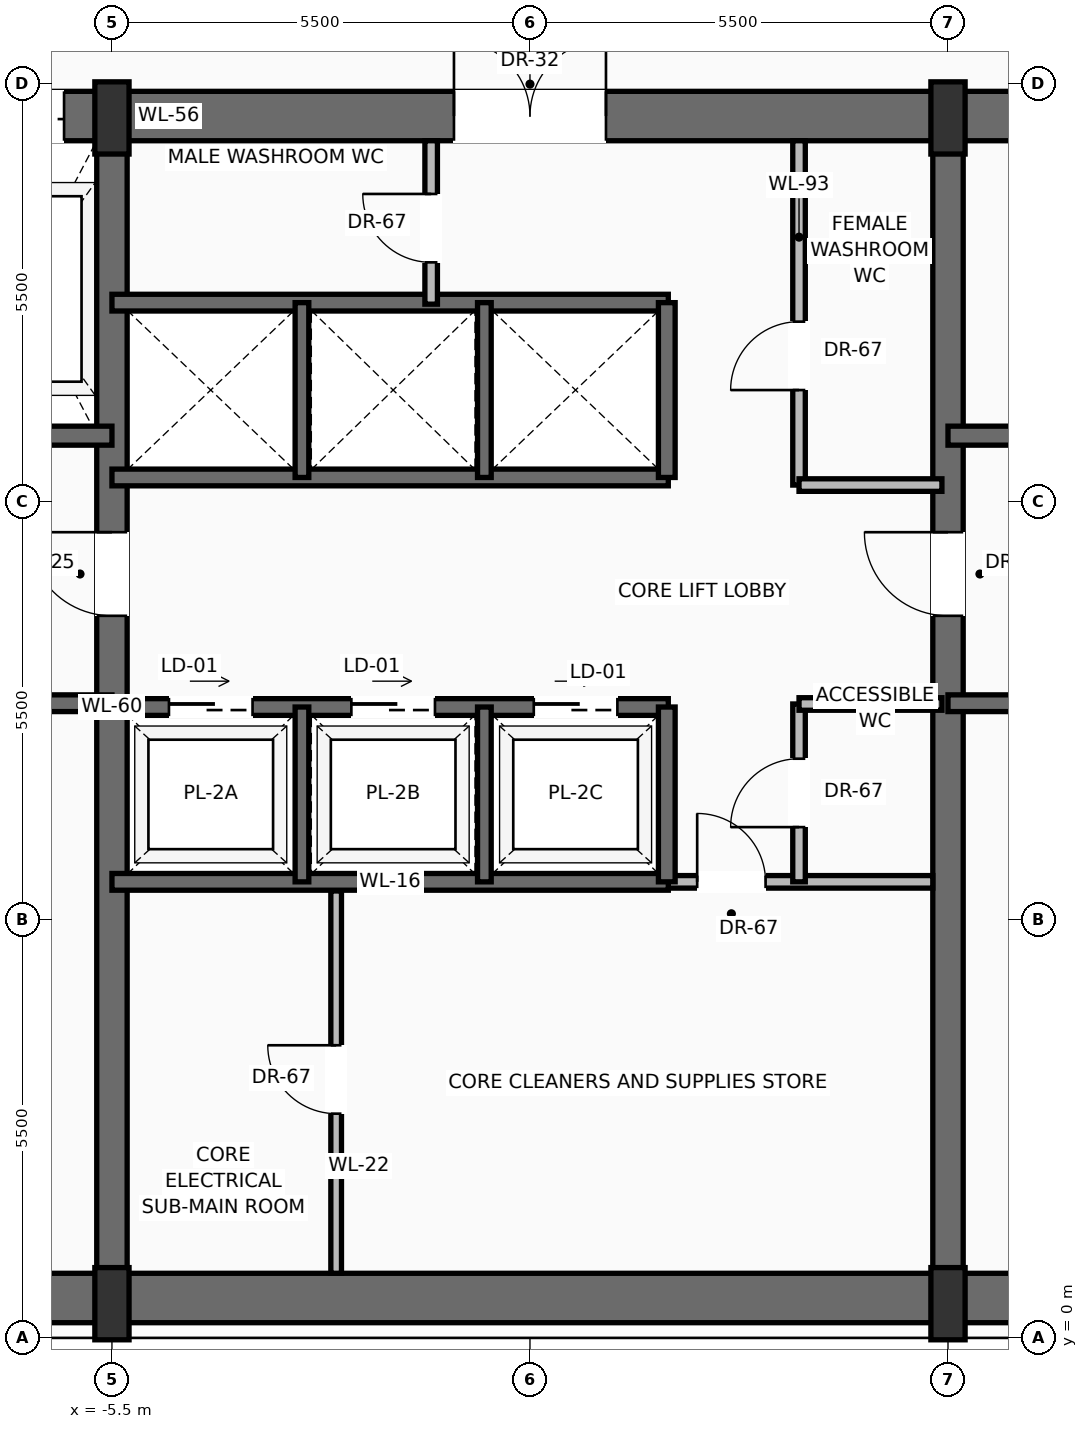
"""IFC4 building model, lengths in metres.
Left out: names, types, materials, properties, quantities, classifications, styles, units other than length and angle.
Written with IfcOpenShell. Run it as: python <this file> out.ifc"""

import sys

from ifc_helpers import new_model, si_unit, direction, frame, frame_2d, origin, origin_2d, place, context, subcontext, project, spatial, rectangle, extrude, source, transform, mapped, element, fill, save


model = new_model("IFC4")
c1 = context("Model", 3, precision=1e-05, world=origin(), true_north=direction((0.0, 1.0)))
c2 = subcontext(c1, "Body", "Model", "MODEL_VIEW")
j1 = project(units=[si_unit("LENGTHUNIT", "METRE"), si_unit("PLANEANGLEUNIT", "RADIAN")], contexts=[c1])
p1 = place(None, origin())
s1 = spatial("IfcSite", under=j1, at=p1, CompositionType="ELEMENT")
p2 = place(p1, origin())
s2 = spatial("IfcBuilding", under=s1, at=p2, CompositionType="ELEMENT")
p3 = place(p2, frame((0.0, 0.0, 189.5)))
s3 = spatial("IfcBuildingStorey", under=s2, at=p3, CompositionType="ELEMENT", Elevation=189.5)
p4 = place(p3, frame((-10.65, 0.525, 0.0), z_axis=(0.0, 0.0, 1.0), x_axis=(1.0, 0.0, 0.0)))
e1 = element("IfcWall", 1, at=p4, inside=s3, PredefinedType="SHEAR", context=c2, shape_type="SweptSolid", body=[
    extrude(rectangle(XDim=21.3, YDim=0.65, at=frame_2d((10.65, 0.0))), origin(), (0.0, 0.0, 1.0), 3.47),
])
p5 = place(p3, frame((-10.8, 16.075, 0.0), z_axis=(0.0, 0.0, 1.0), x_axis=(1.0, 0.0, 0.0)))
e2 = element("IfcWall", 2, at=p5, inside=s3, PredefinedType="SHEAR", context=c2, shape_type="SweptSolid", body=[
    extrude(rectangle(XDim=21.6, YDim=0.65, at=frame_2d((10.8, 0.0))), origin(), (0.0, 0.0, 1.0), 3.47),
])
p6 = place(p5, frame((3.37, 0.0, 0.0)))
e3 = element("IfcOpeningElement", 3, at=p6, cuts=e2, PredefinedType="OPENING", context=c2, shape_type="SweptSolid", body=[
    extrude(rectangle(XDim=1.3, YDim=2.3, at=frame_2d((0.65, 1.15))), frame((0.0, 0.335, 0.0), z_axis=(0.0, -1.0, 0.0), x_axis=(1.0, 0.0, 0.0)), (0.0, 0.0, 1.0), 0.67),
])
p7 = place(p5, frame((9.8, 0.0, 0.0)))
e4 = element("IfcOpeningElement", 4, at=p7, cuts=e2, PredefinedType="OPENING", context=c2, shape_type="SweptSolid", body=[
    extrude(rectangle(XDim=2.0, YDim=2.4, at=frame_2d((1.0, 1.2))), frame((0.0, 0.335, 0.0), z_axis=(0.0, -1.0, 0.0), x_axis=(1.0, 0.0, 0.0)), (0.0, 0.0, 1.0), 0.67),
])
p8 = place(p3, frame((-5.5, 0.525, 0.0), z_axis=(0.0, 0.0, 1.0), x_axis=(0.0, 1.0, 0.0)))
e5 = element("IfcWall", 5, at=p8, inside=s3, PredefinedType="SHEAR", context=c2, shape_type="SweptSolid", body=[
    extrude(rectangle(XDim=15.55, YDim=0.4, at=frame_2d((7.775, 0.0))), origin(), (0.0, 0.0, 1.0), 3.47),
])
p9 = place(p8, frame((8.975, 0.0, 0.0)))
e6 = element("IfcOpeningElement", 6, at=p9, cuts=e5, PredefinedType="OPENING", context=c2, shape_type="SweptSolid", body=[
    extrude(rectangle(XDim=1.1, YDim=2.2, at=frame_2d((0.55, 1.1))), frame((0.0, 0.21, 0.0), z_axis=(0.0, -1.0, 0.0), x_axis=(1.0, 0.0, 0.0)), (0.0, 0.0, 1.0), 0.42),
])
p10 = place(p3, frame((5.5, 0.525, 0.0), z_axis=(0.0, 0.0, 1.0), x_axis=(0.0, 1.0, 0.0)))
e7 = element("IfcWall", 7, at=p10, inside=s3, PredefinedType="SHEAR", context=c2, shape_type="SweptSolid", body=[
    extrude(rectangle(XDim=15.55, YDim=0.4, at=frame_2d((7.775, 0.0))), origin(), (0.0, 0.0, 1.0), 3.47),
])
p11 = place(p10, frame((8.975, 0.0, 0.0)))
e8 = element("IfcOpeningElement", 8, at=p11, cuts=e7, PredefinedType="OPENING", context=c2, shape_type="SweptSolid", body=[
    extrude(rectangle(XDim=1.1, YDim=2.2, at=frame_2d((0.55, 1.1))), frame((0.0, 0.21, 0.0), z_axis=(0.0, -1.0, 0.0), x_axis=(1.0, 0.0, 0.0)), (0.0, 0.0, 1.0), 0.42),
])
m1 = source(origin(), c2, "Body", "SweptSolid", [
    extrude(rectangle(XDim=0.45, YDim=0.95, at=origin_2d()), origin(), (0.0, 0.0, 1.0), 3.7),
])
for number, where, z_axis, x_axis in (
    (9, (-5.5, 0.45, 0.0), (0.0, 0.0, 1.0), (1.0, 0.0, 0.0)),
    (10, (5.5, 0.45, 0.0), (0.0, 0.0, 1.0), (1.0, 0.0, 0.0)),
    (11, (-5.5, 16.05, 0.0), (0.0, 0.0, 1.0), (1.0, 0.0, 0.0)),
    (12, (5.5, 16.05, 0.0), (0.0, 0.0, 1.0), (1.0, 0.0, 0.0)),
):
    element("IfcColumn", number, at=place(p3, frame(where, z_axis=z_axis, x_axis=x_axis)), inside=s3, PredefinedType="PILASTER", context=c2, shape_type="MappedRepresentation", body=[
        mapped(m1, transform((0.0, 0.0, 0.0), scale=1.0)),
    ])
p12 = place(p3, frame((-5.5, 8.35, 0.0), z_axis=(0.0, 0.0, 1.0), x_axis=(-1.0, 0.0, 0.0)))
e13 = element("IfcWall", 13, at=p12, inside=s3, PredefinedType="SOLIDWALL", context=c2, shape_type="SweptSolid", body=[
    extrude(rectangle(XDim=4.65, YDim=0.22, at=frame_2d((2.325, 0.0))), origin(), (0.0, 0.0, 1.0), 3.47),
])
p13 = place(p12, frame((2.5, 0.0, 0.0)))
e14 = element("IfcOpeningElement", 14, at=p13, cuts=e13, PredefinedType="OPENING", context=c2, shape_type="SweptSolid", body=[
    extrude(rectangle(XDim=1.15, YDim=2.2, at=frame_2d((0.575, 1.1))), frame((0.0, 0.12, 0.0), z_axis=(0.0, -1.0, 0.0), x_axis=(1.0, 0.0, 0.0)), (0.0, 0.0, 1.0), 0.24),
])
p14 = place(p3, frame((-5.5, 11.87, 0.0), z_axis=(0.0, 0.0, 1.0), x_axis=(-1.0, 0.0, 0.0)))
e15 = element("IfcWall", 15, at=p14, inside=s3, PredefinedType="SOLIDWALL", context=c2, shape_type="SweptSolid", body=[
    extrude(rectangle(XDim=4.65, YDim=0.25, at=frame_2d((2.325, 0.0))), origin(), (0.0, 0.0, 1.0), 3.47),
])
p15 = place(p14, frame((2.95, 0.0, 0.0)))
e16 = element("IfcOpeningElement", 16, at=p15, cuts=e15, PredefinedType="OPENING", context=c2, shape_type="SweptSolid", body=[
    extrude(rectangle(XDim=1.2, YDim=2.25, at=frame_2d((0.6, 1.125))), frame((0.0, 0.135, 0.0), z_axis=(0.0, -1.0, 0.0), x_axis=(1.0, 0.0, 0.0)), (0.0, 0.0, 1.0), 0.27),
])
p16 = place(p3, frame((10.15, 8.35, 0.0), z_axis=(0.0, 0.0, 1.0), x_axis=(-1.0, 0.0, 0.0)))
e17 = element("IfcWall", 17, at=p16, inside=s3, PredefinedType="SOLIDWALL", context=c2, shape_type="SweptSolid", body=[
    extrude(rectangle(XDim=4.65, YDim=0.22, at=frame_2d((2.325, 0.0))), origin(), (0.0, 0.0, 1.0), 3.47),
])
p17 = place(p16, frame((1.0, 0.0, 0.0)))
e18 = element("IfcOpeningElement", 18, at=p17, cuts=e17, PredefinedType="OPENING", context=c2, shape_type="SweptSolid", body=[
    extrude(rectangle(XDim=1.15, YDim=2.2, at=frame_2d((0.575, 1.1))), frame((0.0, 0.12, 0.0), z_axis=(0.0, -1.0, 0.0), x_axis=(1.0, 0.0, 0.0)), (0.0, 0.0, 1.0), 0.24),
])
p18 = place(p3, frame((10.15, 11.87, 0.0), z_axis=(0.0, 0.0, 1.0), x_axis=(-1.0, 0.0, 0.0)))
e19 = element("IfcWall", 19, at=p18, inside=s3, PredefinedType="SOLIDWALL", context=c2, shape_type="SweptSolid", body=[
    extrude(rectangle(XDim=4.65, YDim=0.25, at=frame_2d((2.325, 0.0))), origin(), (0.0, 0.0, 1.0), 3.47),
])
p19 = place(p18, frame((0.5, 0.0, 0.0)))
e20 = element("IfcOpeningElement", 20, at=p19, cuts=e19, PredefinedType="OPENING", context=c2, shape_type="SweptSolid", body=[
    extrude(rectangle(XDim=1.2, YDim=2.25, at=frame_2d((0.6, 1.125))), frame((0.0, 0.135, 0.0), z_axis=(0.0, -1.0, 0.0), x_axis=(1.0, 0.0, 0.0)), (0.0, 0.0, 1.0), 0.27),
])
p20 = place(p3, frame((1.82, 6.0, 0.0), z_axis=(0.0, 0.0, 1.0), x_axis=(1.0, 0.0, 0.0)))
e21 = element("IfcWall", 21, at=p20, inside=s3, PredefinedType="PARTITIONING", context=c2, shape_type="SweptSolid", body=[
    extrude(rectangle(XDim=3.48, YDim=0.165, at=frame_2d((1.74, 0.0))), origin(), (0.0, 0.0, 1.0), 3.462),
])
p21 = place(p20, frame((0.38, 0.0, 0.0)))
e22 = element("IfcOpeningElement", 22, at=p21, cuts=e21, PredefinedType="OPENING", context=c2, shape_type="SweptSolid", body=[
    extrude(rectangle(XDim=0.9, YDim=2.1, at=frame_2d((0.45, 1.05))), frame((0.0, 0.093, 0.0), z_axis=(0.0, -1.0, 0.0), x_axis=(1.0, 0.0, 0.0)), (0.0, 0.0, 1.0), 0.185),
])
p22 = place(p3, frame((-2.55, 0.85, 0.0), z_axis=(0.0, 0.0, 1.0), x_axis=(0.0, 1.0, 0.0)))
e23 = element("IfcWall", 23, at=p22, inside=s3, PredefinedType="PARTITIONING", context=c2, shape_type="SweptSolid", body=[
    extrude(rectangle(XDim=5.03, YDim=0.14, at=frame_2d((2.515, 0.0))), origin(), (0.0, 0.0, 1.0), 3.462),
])
p23 = place(p22, frame((2.1, 0.0, 0.0)))
e24 = element("IfcOpeningElement", 24, at=p23, cuts=e23, PredefinedType="OPENING", context=c2, shape_type="SweptSolid", body=[
    extrude(rectangle(XDim=0.9, YDim=2.1, at=frame_2d((0.45, 1.05))), frame((0.0, 0.08, 0.0), z_axis=(0.0, -1.0, 0.0), x_axis=(1.0, 0.0, 0.0)), (0.0, 0.0, 1.0), 0.16),
])
p24 = place(p3, frame((3.54, 6.0, 0.0), z_axis=(0.0, 0.0, 1.0), x_axis=(0.0, 1.0, 0.0)))
e25 = element("IfcWall", 25, at=p24, inside=s3, PredefinedType="PARTITIONING", context=c2, shape_type="SweptSolid", body=[
    extrude(rectangle(XDim=2.34, YDim=0.165, at=frame_2d((1.17, 0.0))), origin(), (0.0, 0.0, 1.0), 3.462),
])
p25 = place(p24, frame((0.72, 0.0, 0.0)))
e26 = element("IfcOpeningElement", 26, at=p25, cuts=e25, PredefinedType="OPENING", context=c2, shape_type="SweptSolid", body=[
    extrude(rectangle(XDim=0.9, YDim=2.1, at=frame_2d((0.45, 1.05))), frame((0.0, 0.093, 0.0), z_axis=(0.0, -1.0, 0.0), x_axis=(1.0, 0.0, 0.0)), (0.0, 0.0, 1.0), 0.185),
])
p26 = place(p3, frame((3.54, 8.34, 0.0), z_axis=(0.0, 0.0, 1.0), x_axis=(1.0, 0.0, 0.0)))
e27 = element("IfcWall", 27, at=p26, inside=s3, PredefinedType="PARTITIONING", context=c2, shape_type="SweptSolid", body=[
    extrude(rectangle(XDim=1.88, YDim=0.165, at=frame_2d((0.94, 0.0))), origin(), (0.0, 0.0, 1.0), 3.462),
])
p27 = place(p3, frame((-5.5, 6.0, 0.0), z_axis=(0.0, 0.0, 1.0), x_axis=(1.0, 0.0, 0.0)))
e28 = element("IfcWall", 28, at=p27, inside=s3, PredefinedType="SOLIDWALL", context=c2, shape_type="SweptSolid", body=[
    extrude(rectangle(XDim=7.32, YDim=0.22, at=frame_2d((3.66, 0.0))), origin(), (0.0, 0.0, 1.0), 3.47),
])
p28 = place(p3, frame((-5.5, 8.3, 0.0), z_axis=(0.0, 0.0, 1.0), x_axis=(1.0, 0.0, 0.0)))
e29 = element("IfcWall", 29, at=p28, inside=s3, PredefinedType="SOLIDWALL", context=c2, shape_type="SweptSolid", body=[
    extrude(rectangle(XDim=7.32, YDim=0.22, at=frame_2d((3.66, 0.0))), origin(), (0.0, 0.0, 1.0), 3.47),
])
p29 = place(p28, frame((0.75, 0.0, 0.0)))
e30 = element("IfcOpeningElement", 30, at=p29, cuts=e29, PredefinedType="OPENING", context=c2, shape_type="SweptSolid", body=[
    extrude(rectangle(XDim=1.1, YDim=2.2, at=frame_2d((0.55, 1.1))), frame((0.0, 0.12, 0.0), z_axis=(0.0, -1.0, 0.0), x_axis=(1.0, 0.0, 0.0)), (0.0, 0.0, 1.0), 0.24),
])
p30 = place(p28, frame((3.15, 0.0, 0.0)))
e31 = element("IfcOpeningElement", 31, at=p30, cuts=e29, PredefinedType="OPENING", context=c2, shape_type="SweptSolid", body=[
    extrude(rectangle(XDim=1.1, YDim=2.2, at=frame_2d((0.55, 1.1))), frame((0.0, 0.12, 0.0), z_axis=(0.0, -1.0, 0.0), x_axis=(1.0, 0.0, 0.0)), (0.0, 0.0, 1.0), 0.24),
])
p31 = place(p28, frame((5.55, 0.0, 0.0)))
e32 = element("IfcOpeningElement", 32, at=p31, cuts=e29, PredefinedType="OPENING", context=c2, shape_type="SweptSolid", body=[
    extrude(rectangle(XDim=1.1, YDim=2.2, at=frame_2d((0.55, 1.1))), frame((0.0, 0.12, 0.0), z_axis=(0.0, -1.0, 0.0), x_axis=(1.0, 0.0, 0.0)), (0.0, 0.0, 1.0), 0.24),
])
p32 = place(p3, frame((1.8, 6.0, 0.0), z_axis=(0.0, 0.0, 1.0), x_axis=(0.0, 1.0, 0.0)))
e33 = element("IfcWall", 33, at=p32, inside=s3, PredefinedType="SOLIDWALL", context=c2, shape_type="SweptSolid", body=[
    extrude(rectangle(XDim=2.3, YDim=0.22, at=frame_2d((1.15, 0.0))), origin(), (0.0, 0.0, 1.0), 3.47),
])
for number, where, z_axis, x_axis in (
    (34, (-3.0, 6.0, 0.0), (0.0, 0.0, 1.0), (0.0, 1.0, 0.0)),
    (35, (-0.6, 6.0, 0.0), (0.0, 0.0, 1.0), (0.0, 1.0, 0.0)),
):
    element("IfcWall", number, at=place(p3, frame(where, z_axis=z_axis, x_axis=x_axis)), inside=s3, PredefinedType="SOLIDWALL", context=c2, shape_type="SweptSolid", body=[
        extrude(rectangle(XDim=2.3, YDim=0.18, at=frame_2d((1.15, 0.0))), origin(), (0.0, 0.0, 1.0), 3.47),
    ])
for number, where, z_axis, x_axis in (
    (36, (-5.5, 11.32, 0.0), (0.0, 0.0, 1.0), (1.0, 0.0, 0.0)),
    (37, (-5.5, 13.62, 0.0), (0.0, 0.0, 1.0), (1.0, 0.0, 0.0)),
):
    element("IfcWall", number, at=place(p3, frame(where, z_axis=z_axis, x_axis=x_axis)), inside=s3, PredefinedType="SOLIDWALL", context=c2, shape_type="SweptSolid", body=[
        extrude(rectangle(XDim=7.32, YDim=0.22, at=frame_2d((3.66, 0.0))), origin(), (0.0, 0.0, 1.0), 3.47),
    ])
p33 = place(p3, frame((1.8, 11.32, 0.0), z_axis=(0.0, 0.0, 1.0), x_axis=(0.0, 1.0, 0.0)))
e38 = element("IfcWall", 38, at=p33, inside=s3, PredefinedType="SOLIDWALL", context=c2, shape_type="SweptSolid", body=[
    extrude(rectangle(XDim=2.3, YDim=0.22, at=frame_2d((1.15, 0.0))), origin(), (0.0, 0.0, 1.0), 3.47),
])
for number, where, z_axis, x_axis in (
    (39, (-3.0, 11.32, 0.0), (0.0, 0.0, 1.0), (0.0, 1.0, 0.0)),
    (40, (-0.6, 11.32, 0.0), (0.0, 0.0, 1.0), (0.0, 1.0, 0.0)),
):
    element("IfcWall", number, at=place(p3, frame(where, z_axis=z_axis, x_axis=x_axis)), inside=s3, PredefinedType="SOLIDWALL", context=c2, shape_type="SweptSolid", body=[
        extrude(rectangle(XDim=2.3, YDim=0.18, at=frame_2d((1.15, 0.0))), origin(), (0.0, 0.0, 1.0), 3.47),
    ])
p34 = place(p3, frame((-1.3, 13.6, 0.0), z_axis=(0.0, 0.0, 1.0), x_axis=(0.0, 1.0, 0.0)))
e41 = element("IfcWall", 41, at=p34, inside=s3, PredefinedType="PARTITIONING", context=c2, shape_type="SweptSolid", body=[
    extrude(rectangle(XDim=2.15, YDim=0.165, at=frame_2d((1.075, 0.0))), origin(), (0.0, 0.0, 1.0), 3.462),
])
p35 = place(p34, frame((0.55, 0.0, 0.0)))
e42 = element("IfcOpeningElement", 42, at=p35, cuts=e41, PredefinedType="OPENING", context=c2, shape_type="SweptSolid", body=[
    extrude(rectangle(XDim=0.9, YDim=2.1, at=frame_2d((0.45, 1.05))), frame((0.0, 0.093, 0.0), z_axis=(0.0, -1.0, 0.0), x_axis=(1.0, 0.0, 0.0)), (0.0, 0.0, 1.0), 0.185),
])
p36 = place(p3, frame((3.54, 11.22, 0.0), z_axis=(0.0, 0.0, 1.0), x_axis=(0.0, 1.0, 0.0)))
e43 = element("IfcWall", 43, at=p36, inside=s3, PredefinedType="PARTITIONING", context=c2, shape_type="SweptSolid", body=[
    extrude(rectangle(XDim=4.53, YDim=0.165, at=frame_2d((2.265, 0.0))), origin(), (0.0, 0.0, 1.0), 3.462),
])
p37 = place(p36, frame((1.25, 0.0, 0.0)))
e44 = element("IfcOpeningElement", 44, at=p37, cuts=e43, PredefinedType="OPENING", context=c2, shape_type="SweptSolid", body=[
    extrude(rectangle(XDim=0.9, YDim=2.1, at=frame_2d((0.45, 1.05))), frame((0.0, 0.093, 0.0), z_axis=(0.0, -1.0, 0.0), x_axis=(1.0, 0.0, 0.0)), (0.0, 0.0, 1.0), 0.185),
])
p38 = place(p3, frame((3.54, 11.22, 0.0), z_axis=(0.0, 0.0, 1.0), x_axis=(1.0, 0.0, 0.0)))
e45 = element("IfcWall", 45, at=p38, inside=s3, PredefinedType="PARTITIONING", context=c2, shape_type="SweptSolid", body=[
    extrude(rectangle(XDim=1.88, YDim=0.165, at=frame_2d((0.94, 0.0))), origin(), (0.0, 0.0, 1.0), 3.462),
])
m2 = source(origin(), c2, "Body", "SweptSolid", [
    extrude(rectangle(XDim=1.1, YDim=2.2, at=frame_2d((0.55, 1.1))), frame((0.0, 0.025, 0.0), z_axis=(0.0, -1.0, 0.0), x_axis=(1.0, 0.0, 0.0)), (0.0, 0.0, 1.0), 0.05),
])
p39 = place(p9, origin())
e46 = element("IfcDoor", 46, at=p39, inside=s3, OperationType="SINGLE_SWING_RIGHT", PredefinedType="DOOR", context=c2, shape_type="MappedRepresentation", body=[
    mapped(m2, transform((0.0, 0.0, 0.0), scale=1.0)),
])
fill(e6, e46)
m3 = source(origin(), c2, "Body", "SweptSolid", [
    extrude(rectangle(XDim=1.3, YDim=2.3, at=frame_2d((0.65, 1.15))), frame((0.0, 0.025, 0.0), z_axis=(0.0, -1.0, 0.0), x_axis=(1.0, 0.0, 0.0)), (0.0, 0.0, 1.0), 0.05),
])
p40 = place(p6, origin())
e47 = element("IfcDoor", 47, at=p40, inside=s3, OperationType="SLIDING_TO_RIGHT", PredefinedType="DOOR", context=c2, shape_type="MappedRepresentation", body=[
    mapped(m3, transform((0.0, 0.0, 0.0), scale=1.0)),
])
fill(e3, e47)
p41 = place(p11, origin())
e48 = element("IfcDoor", 48, at=p41, inside=s3, OperationType="SINGLE_SWING_RIGHT", PredefinedType="DOOR", context=c2, shape_type="MappedRepresentation", body=[
    mapped(m2, transform((0.0, 0.0, 0.0), scale=1.0)),
])
fill(e8, e48)
m4 = source(origin(), c2, "Body", "SweptSolid", [
    extrude(rectangle(XDim=2.0, YDim=2.4, at=frame_2d((1.0, 1.2))), frame((0.0, 0.025, 0.0), z_axis=(0.0, -1.0, 0.0), x_axis=(1.0, 0.0, 0.0)), (0.0, 0.0, 1.0), 0.05),
])
p42 = place(p7, origin())
e49 = element("IfcDoor", 49, at=p42, inside=s3, OperationType="DOUBLE_DOOR_SINGLE_SWING", PredefinedType="DOOR", context=c2, shape_type="MappedRepresentation", body=[
    mapped(m4, transform((0.0, 0.0, 0.0), scale=1.0)),
])
fill(e4, e49)
m5 = source(origin(), c2, "Body", "SweptSolid", [
    extrude(rectangle(XDim=0.9, YDim=2.1, at=frame_2d((0.45, 1.05))), frame((0.0, 0.025, 0.0), z_axis=(0.0, -1.0, 0.0), x_axis=(1.0, 0.0, 0.0)), (0.0, 0.0, 1.0), 0.05),
])
p43 = place(p21, origin())
e50 = element("IfcDoor", 50, at=p43, inside=s3, OperationType="SINGLE_SWING_LEFT", PredefinedType="DOOR", context=c2, shape_type="MappedRepresentation", body=[
    mapped(m5, transform((0.0, 0.0, 0.0), scale=1.0)),
])
fill(e22, e50)
p44 = place(p23, origin())
e51 = element("IfcDoor", 51, at=p44, inside=s3, OperationType="SINGLE_SWING_RIGHT", PredefinedType="DOOR", context=c2, shape_type="MappedRepresentation", body=[
    mapped(m5, transform((0.0, 0.0, 0.0), scale=1.0)),
])
fill(e24, e51)
p45 = place(p25, origin())
e52 = element("IfcDoor", 52, at=p45, inside=s3, OperationType="SINGLE_SWING_LEFT", PredefinedType="DOOR", context=c2, shape_type="MappedRepresentation", body=[
    mapped(m5, transform((0.0, 0.0, 0.0), scale=1.0)),
])
fill(e26, e52)
m6 = source(origin(), c2, "Body", "SweptSolid", [
    extrude(rectangle(XDim=1.1, YDim=2.2, at=frame_2d((0.55, 1.1))), frame((0.0, 0.025, 0.0), z_axis=(0.0, -1.0, 0.0), x_axis=(1.0, 0.0, 0.0)), (0.0, 0.0, 1.0), 0.05),
])
p46 = place(p29, origin())
e53 = element("IfcDoor", 53, at=p46, inside=s3, OperationType="SLIDING_TO_LEFT", PredefinedType="DOOR", context=c2, shape_type="MappedRepresentation", body=[
    mapped(m6, transform((0.0, 0.0, 0.0), scale=1.0)),
])
fill(e30, e53)
p47 = place(p30, origin())
e54 = element("IfcDoor", 54, at=p47, inside=s3, OperationType="SLIDING_TO_LEFT", PredefinedType="DOOR", context=c2, shape_type="MappedRepresentation", body=[
    mapped(m6, transform((0.0, 0.0, 0.0), scale=1.0)),
])
fill(e31, e54)
p48 = place(p31, origin())
e55 = element("IfcDoor", 55, at=p48, inside=s3, OperationType="SLIDING_TO_LEFT", PredefinedType="DOOR", context=c2, shape_type="MappedRepresentation", body=[
    mapped(m6, transform((0.0, 0.0, 0.0), scale=1.0)),
])
fill(e32, e55)
p49 = place(p35, origin())
e56 = element("IfcDoor", 56, at=p49, inside=s3, OperationType="SINGLE_SWING_RIGHT", PredefinedType="DOOR", context=c2, shape_type="MappedRepresentation", body=[
    mapped(m5, transform((0.0, 0.0, 0.0), scale=1.0)),
])
fill(e42, e56)
p50 = place(p37, origin())
e57 = element("IfcDoor", 57, at=p50, inside=s3, OperationType="SINGLE_SWING_LEFT", PredefinedType="DOOR", context=c2, shape_type="MappedRepresentation", body=[
    mapped(m5, transform((0.0, 0.0, 0.0), scale=1.0)),
])
fill(e44, e57)
save(model, sys.argv[1])
